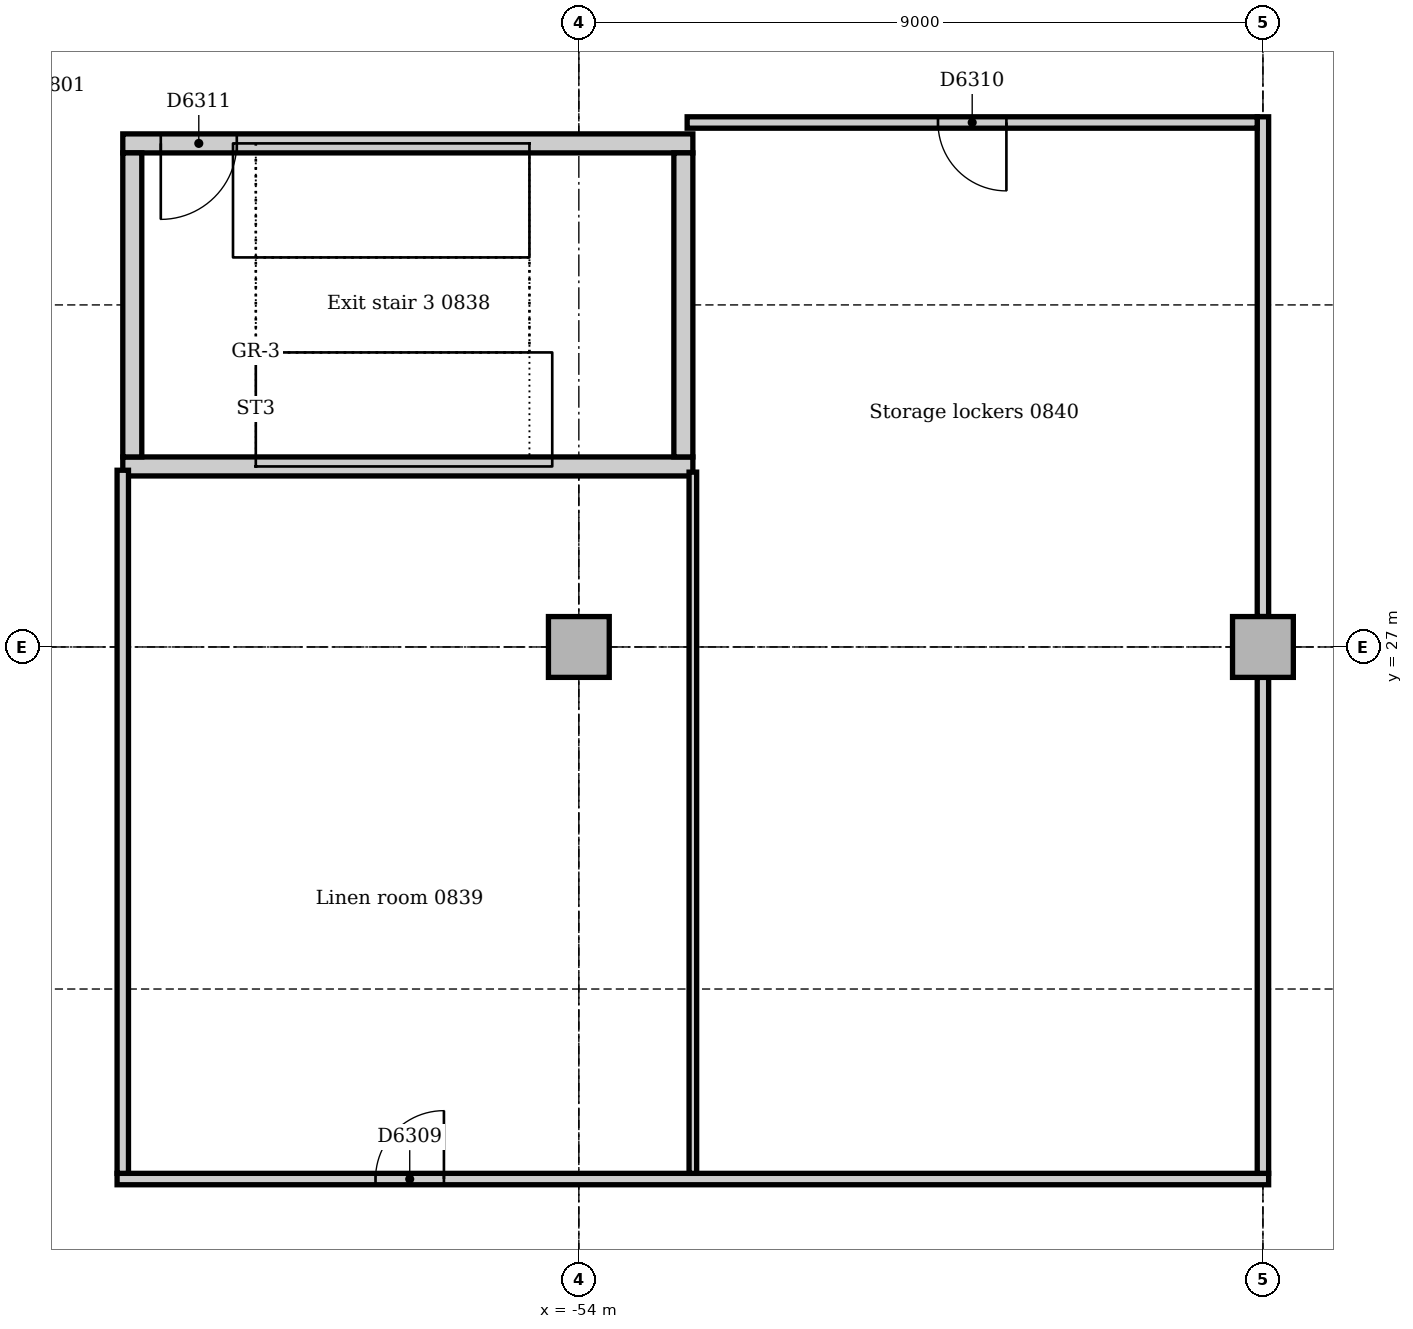
"""IFC4 building model, lengths in metres.
Left out: names, types, materials, properties, quantities, classifications, styles, units other than length and angle.
Written with IfcOpenShell. Run it as: python <this file> out.ifc"""

import sys

from ifc_helpers import new_model, si_unit, direction, frame, frame_2d, origin, origin_2d, place, context, subcontext, project, spatial, rectangle, extrude, element, fill, save


model = new_model("IFC4")
c1 = context("Model", 3, precision=1e-05, world=origin(), true_north=direction((0.0, 1.0)))
c2 = subcontext(c1, "Body", "Model", "MODEL_VIEW")
j1 = project(units=[si_unit("LENGTHUNIT", "METRE"), si_unit("PLANEANGLEUNIT", "RADIAN")], contexts=[c1])
p1 = place(None, origin())
s1 = spatial("IfcSite", under=j1, at=p1, CompositionType="ELEMENT")
p2 = place(p1, origin())
s2 = spatial("IfcBuilding", under=s1, at=p2, CompositionType="ELEMENT")
p3 = place(p2, frame((0.0, 0.0, 38.0)))
s3 = spatial("IfcBuildingStorey", under=s2, at=p3, CompositionType="ELEMENT", Elevation=38.0)
p4 = place(p3, frame((-60.0, 29.375, 0.0), z_axis=(0.0, 0.0, 1.0), x_axis=(1.0, 0.0, 0.0)))
e1 = element("IfcWall", 1, at=p4, inside=s3, PredefinedType="SOLIDWALL", context=c2, shape_type="SweptSolid", body=[
    extrude(rectangle(XDim=7.5, YDim=0.25, at=frame_2d((3.75, 0.0))), origin(), (0.0, 0.0, 1.0), 4.0),
])
p5 = place(p3, frame((-52.5, 33.625, 0.0), z_axis=(0.0, 0.0, 1.0), x_axis=(-1.0, 0.0, 0.0)))
e2 = element("IfcWall", 2, at=p5, inside=s3, PredefinedType="SOLIDWALL", context=c2, shape_type="SweptSolid", body=[
    extrude(rectangle(XDim=7.5, YDim=0.25, at=frame_2d((3.75, 0.0))), origin(), (0.0, 0.0, 1.0), 4.0),
])
p6 = place(p5, frame((6.0, 0.0, 0.0)))
e3 = element("IfcOpeningElement", 3, at=p6, cuts=e2, PredefinedType="OPENING", context=c2, shape_type="SweptSolid", body=[
    extrude(rectangle(XDim=1.0, YDim=2.1, at=frame_2d((0.5, 1.05))), frame((0.0, 0.135, 0.0), z_axis=(0.0, -1.0, 0.0), x_axis=(1.0, 0.0, 0.0)), (0.0, 0.0, 1.0), 0.27),
])
for number, where, z_axis, x_axis in (
    (4, (-52.625, 29.5, 0.0), (0.0, 0.0, 1.0), (0.0, 1.0, 0.0)),
    (5, (-59.875, 33.5, 0.0), (0.0, 0.0, 1.0), (0.0, -1.0, 0.0)),
):
    element("IfcWall", number, at=place(p3, frame(where, z_axis=z_axis, x_axis=x_axis)), inside=s3, PredefinedType="SOLIDWALL", context=c2, shape_type="SweptSolid", body=[
        extrude(rectangle(XDim=4.0, YDim=0.25, at=frame_2d((2.0, 0.0))), origin(), (0.0, 0.0, 1.0), 4.0),
    ])
for number, where, z_axis, x_axis in (
    (6, (-54.0, 27.0, 0.0), (0.0, 0.0, 1.0), (1.0, 0.0, 0.0)),
    (7, (-45.0, 27.0, 0.0), (0.0, 0.0, 1.0), (1.0, 0.0, 0.0)),
):
    element("IfcColumn", number, at=place(p3, frame(where, z_axis=z_axis, x_axis=x_axis)), inside=s3, PredefinedType="COLUMN", context=c2, shape_type="SweptSolid", body=[
        extrude(rectangle(XDim=0.8, YDim=0.8, at=origin_2d()), origin(), (0.0, 0.0, 1.0), 3.85),
    ])
p7 = place(p3, frame((-60.075, 20.0, 0.0), z_axis=(0.0, 0.0, 1.0), x_axis=(1.0, 0.0, 0.0)))
e8 = element("IfcWall", 8, at=p7, inside=s3, PredefinedType="PARTITIONING", context=c2, shape_type="SweptSolid", body=[
    extrude(rectangle(XDim=15.15, YDim=0.15, at=frame_2d((7.575, 0.0))), origin(), (0.0, 0.0, 1.0), 3.85),
])
p8 = place(p7, frame((3.4, 0.0, 0.0)))
e9 = element("IfcOpeningElement", 9, at=p8, cuts=e8, PredefinedType="OPENING", context=c2, shape_type="SweptSolid", body=[
    extrude(rectangle(XDim=0.9, YDim=2.1, at=frame_2d((0.45, 1.05))), frame((0.0, 0.085, 0.0), z_axis=(0.0, -1.0, 0.0), x_axis=(1.0, 0.0, 0.0)), (0.0, 0.0, 1.0), 0.17),
])
p9 = place(p3, frame((-45.0, 20.075, 0.0), z_axis=(0.0, 0.0, 1.0), x_axis=(0.0, 1.0, 0.0)))
e10 = element("IfcWall", 10, at=p9, inside=s3, PredefinedType="PARTITIONING", context=c2, shape_type="SweptSolid", body=[
    extrude(rectangle(XDim=6.525, YDim=0.15, at=frame_2d((3.263, 0.0))), origin(), (0.0, 0.0, 1.0), 3.158),
])
p10 = place(p3, frame((-45.0, 27.4, 0.0), z_axis=(0.0, 0.0, 1.0), x_axis=(0.0, 1.0, 0.0)))
e11 = element("IfcWall", 11, at=p10, inside=s3, PredefinedType="PARTITIONING", context=c2, shape_type="SweptSolid", body=[
    extrude(rectangle(XDim=6.575, YDim=0.15, at=frame_2d((3.288, 0.0))), origin(), (0.0, 0.0, 1.0), 3.158),
])
p11 = place(p3, frame((-60.0, 20.075, 0.0), z_axis=(0.0, 0.0, 1.0), x_axis=(0.0, 1.0, 0.0)))
e12 = element("IfcWall", 12, at=p11, inside=s3, PredefinedType="PARTITIONING", context=c2, shape_type="SweptSolid", body=[
    extrude(rectangle(XDim=9.25, YDim=0.15, at=frame_2d((4.625, 0.0))), origin(), (0.0, 0.0, 1.0), 3.85),
])
p12 = place(p3, frame((-52.575, 33.9, 0.0), z_axis=(0.0, 0.0, 1.0), x_axis=(1.0, 0.0, 0.0)))
e13 = element("IfcWall", 13, at=p12, inside=s3, PredefinedType="PARTITIONING", context=c2, shape_type="SweptSolid", body=[
    extrude(rectangle(XDim=7.5, YDim=0.15, at=frame_2d((3.75, 0.0))), origin(), (0.0, 0.0, 1.0), 3.85),
])
p13 = place(p12, frame((3.3, 0.0, 0.0)))
e14 = element("IfcOpeningElement", 14, at=p13, cuts=e13, PredefinedType="OPENING", context=c2, shape_type="SweptSolid", body=[
    extrude(rectangle(XDim=0.9, YDim=2.1, at=frame_2d((0.45, 1.05))), frame((0.0, 0.085, 0.0), z_axis=(0.0, -1.0, 0.0), x_axis=(1.0, 0.0, 0.0)), (0.0, 0.0, 1.0), 0.17),
])
p14 = place(p3, frame((-52.5, 20.075, 0.0), z_axis=(0.0, 0.0, 1.0), x_axis=(0.0, 1.0, 0.0)))
e15 = element("IfcWall", 15, at=p14, inside=s3, PredefinedType="PARTITIONING", context=c2, shape_type="SweptSolid", body=[
    extrude(rectangle(XDim=9.225, YDim=0.1, at=frame_2d((4.612, 0.0))), origin(), (0.0, 0.0, 1.0), 3.85),
])
p15 = place(p8, origin())
e16 = element("IfcDoor", 16, at=p15, inside=s3, OperationType="SINGLE_SWING_RIGHT", PredefinedType="DOOR", context=c2, shape_type="SweptSolid", body=[
    extrude(rectangle(XDim=0.9, YDim=2.1, at=frame_2d((0.45, 1.05))), frame((0.0, 0.025, 0.0), z_axis=(0.0, -1.0, 0.0), x_axis=(1.0, 0.0, 0.0)), (0.0, 0.0, 1.0), 0.05),
])
fill(e9, e16)
p16 = place(p13, frame((0.9, 0.0, 0.0), z_axis=(0.0, 0.0, 1.0), x_axis=(-1.0, 0.0, 0.0)))
e17 = element("IfcDoor", 17, at=p16, inside=s3, OperationType="SINGLE_SWING_LEFT", PredefinedType="DOOR", context=c2, shape_type="SweptSolid", body=[
    extrude(rectangle(XDim=0.9, YDim=2.1, at=frame_2d((0.45, 1.05))), frame((0.0, 0.025, 0.0), z_axis=(0.0, -1.0, 0.0), x_axis=(1.0, 0.0, 0.0)), (0.0, 0.0, 1.0), 0.05),
])
fill(e14, e17)
p17 = place(p6, origin())
e18 = element("IfcDoor", 18, at=p17, inside=s3, OperationType="SINGLE_SWING_RIGHT", PredefinedType="DOOR", context=c2, shape_type="SweptSolid", body=[
    extrude(rectangle(XDim=1.0, YDim=2.1, at=frame_2d((0.5, 1.05))), frame((0.0, 0.025, 0.0), z_axis=(0.0, -1.0, 0.0), x_axis=(1.0, 0.0, 0.0)), (0.0, 0.0, 1.0), 0.05),
])
fill(e3, e18)
save(model, sys.argv[1])
